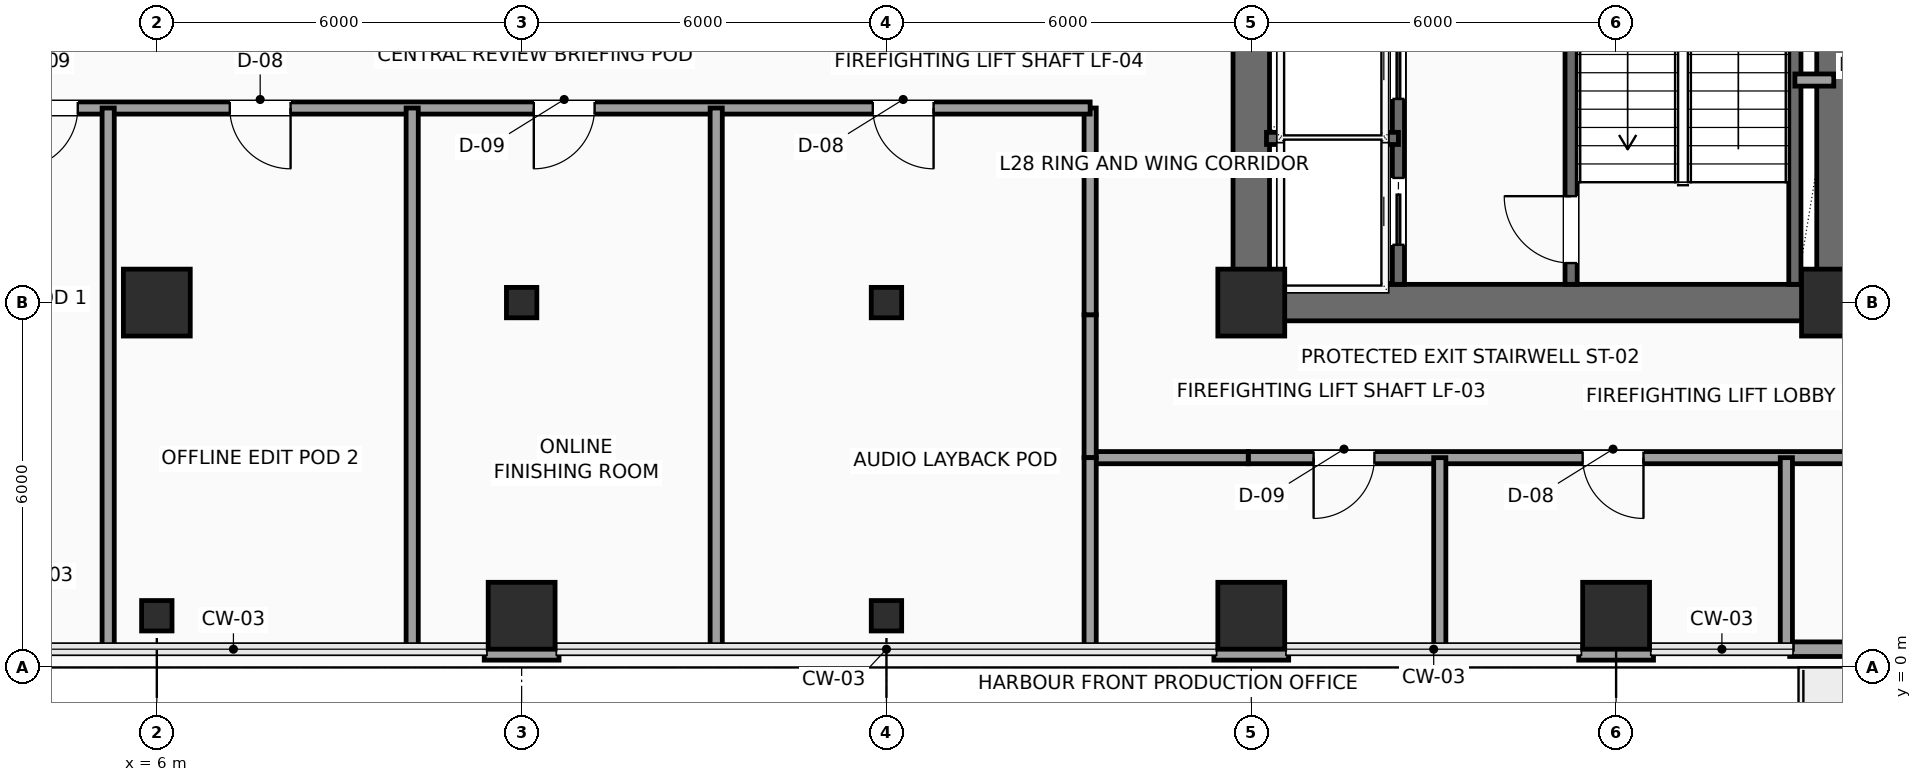
"""IFC4 building model, lengths in metres.
Left out: names, types, materials, properties, quantities, classifications, styles, units other than length and angle.
Written with IfcOpenShell. Run it as: python <this file> out.ifc"""

import sys

from ifc_helpers import new_model, si_unit, direction, frame, frame_2d, origin, origin_2d, place, context, subcontext, project, spatial, rectangle, hollow_rectangle, extrude, element, fill, save


model = new_model("IFC4")
c1 = context("Model", 3, precision=1e-05, world=origin(), true_north=direction((0.0, 1.0)))
c2 = subcontext(c1, "Body", "Model", "MODEL_VIEW")
j1 = project(units=[si_unit("LENGTHUNIT", "METRE"), si_unit("PLANEANGLEUNIT", "RADIAN")], contexts=[c1])
p1 = place(None, origin())
s1 = spatial("IfcSite", under=j1, at=p1, CompositionType="ELEMENT")
p2 = place(p1, origin())
s2 = spatial("IfcBuilding", under=s1, at=p2, CompositionType="ELEMENT")
p3 = place(p2, frame((0.0, 0.0, 119.4)))
s3 = spatial("IfcBuildingStorey", under=s2, at=p3, CompositionType="ELEMENT", Elevation=119.4)
for number, where, z_axis, x_axis in (
    (1, (24.0, 6.0, 0.0), (0.0, 0.0, 1.0), (1.0, 0.0, 0.0)),
    (2, (33.6, 6.0, 0.0), (0.0, 0.0, 1.0), (1.0, 0.0, 0.0)),
):
    element("IfcColumn", number, at=place(p3, frame(where, z_axis=z_axis, x_axis=x_axis)), inside=s3, PredefinedType="COLUMN", context=c2, shape_type="SweptSolid", body=[
        extrude(rectangle(XDim=1.1, YDim=1.1, at=origin_2d()), origin(), (0.0, 0.0, 1.0), 3.75),
    ])
p4 = place(p3, frame((6.0, 0.85, 0.0), z_axis=(0.0, 0.0, 1.0), x_axis=(1.0, 0.0, 0.0)))
e3 = element("IfcColumn", 3, at=p4, inside=s3, PredefinedType="COLUMN", context=c2, shape_type="SweptSolid", body=[
    extrude(hollow_rectangle(XDim=0.5, YDim=0.5, WallThickness=0.025, InnerFilletRadius=0.025, OuterFilletRadius=0.04, at=origin_2d()), origin(), (0.0, 0.0, 1.0), 3.75),
])
for number, where, z_axis, x_axis in (
    (4, (6.0, 6.0, 0.0), (0.0, 0.0, 1.0), (1.0, 0.0, 0.0)),
    (5, (12.0, 0.85, 0.0), (0.0, 0.0, 1.0), (1.0, 0.0, 0.0)),
):
    element("IfcColumn", number, at=place(p3, frame(where, z_axis=z_axis, x_axis=x_axis)), inside=s3, PredefinedType="COLUMN", context=c2, shape_type="SweptSolid", body=[
        extrude(rectangle(XDim=1.1, YDim=1.1, at=origin_2d()), origin(), (0.0, 0.0, 1.0), 3.75),
    ])
for number, where, z_axis, x_axis in (
    (6, (12.0, 6.0, 0.0), (0.0, 0.0, 1.0), (1.0, 0.0, 0.0)),
    (7, (18.0, 0.85, 0.0), (0.0, 0.0, 1.0), (1.0, 0.0, 0.0)),
    (8, (18.0, 6.0, 0.0), (0.0, 0.0, 1.0), (1.0, 0.0, 0.0)),
):
    element("IfcColumn", number, at=place(p3, frame(where, z_axis=z_axis, x_axis=x_axis)), inside=s3, PredefinedType="COLUMN", context=c2, shape_type="SweptSolid", body=[
        extrude(hollow_rectangle(XDim=0.5, YDim=0.5, WallThickness=0.025, InnerFilletRadius=0.025, OuterFilletRadius=0.04, at=origin_2d()), origin(), (0.0, 0.0, 1.0), 3.75),
    ])
for number, where, z_axis, x_axis in (
    (9, (24.0, 0.85, 0.0), (0.0, 0.0, 1.0), (1.0, 0.0, 0.0)),
    (10, (30.0, 0.85, 0.0), (0.0, 0.0, 1.0), (1.0, 0.0, 0.0)),
):
    element("IfcColumn", number, at=place(p3, frame(where, z_axis=z_axis, x_axis=x_axis)), inside=s3, PredefinedType="COLUMN", context=c2, shape_type="SweptSolid", body=[
        extrude(rectangle(XDim=1.1, YDim=1.1, at=origin_2d()), origin(), (0.0, 0.0, 1.0), 3.75),
    ])
p5 = place(p3, frame((42.145, 0.3, 0.0), z_axis=(0.0, 0.0, 1.0), x_axis=(-1.0, 0.0, 0.0)))
e11 = element("IfcWall", 11, at=p5, inside=s3, PredefinedType="SOLIDWALL", context=c2, shape_type="SweptSolid", body=[
    extrude(rectangle(XDim=9.29, YDim=0.24, at=frame_2d((4.645, 0.0))), origin(), (0.0, 0.0, 1.0), 3.525),
])
p6 = place(p5, frame((4.2, 0.0, 0.0)))
e12 = element("IfcOpeningElement", 12, at=p6, cuts=e11, PredefinedType="OPENING", context=c2, shape_type="SweptSolid", body=[
    extrude(rectangle(XDim=1.05, YDim=2.2, at=frame_2d((0.525, 1.1))), frame((0.0, 0.13, 0.0), z_axis=(0.0, -1.0, 0.0), x_axis=(1.0, 0.0, 0.0)), (0.0, 0.0, 1.0), 0.26),
])
for number, where, z_axis, x_axis in (
    (13, (30.615, 0.24, 0.0), (0.0, 0.0, 1.0), (-1.0, 0.0, 0.0)),
    (14, (24.615, 0.24, 0.0), (0.0, 0.0, 1.0), (-1.0, 0.0, 0.0)),
    (15, (12.615, 0.24, 0.0), (0.0, 0.0, 1.0), (-1.0, 0.0, 0.0)),
):
    element("IfcWall", number, at=place(p3, frame(where, z_axis=z_axis, x_axis=x_axis)), inside=s3, PredefinedType="SOLIDWALL", context=c2, shape_type="SweptSolid", body=[
        extrude(rectangle(XDim=1.23, YDim=0.24, at=frame_2d((0.615, 0.0))), origin(), (0.0, 0.0, 1.0), 3.525),
    ])
p7 = place(p3, frame((24.0, 6.0, 0.0), z_axis=(0.0, 0.0, 1.0), x_axis=(1.0, 0.0, 0.0)))
e16 = element("IfcWall", 16, at=p7, inside=s3, PredefinedType="SHEAR", context=c2, shape_type="SweptSolid", body=[
    extrude(rectangle(XDim=9.6, YDim=0.6, at=frame_2d((4.8, 0.0))), origin(), (0.0, 0.0, 1.0), 3.525),
])
p8 = place(p3, frame((24.0, 6.0, 0.0), z_axis=(0.0, 0.0, 1.0), x_axis=(0.0, 1.0, 0.0)))
e17 = element("IfcWall", 17, at=p8, inside=s3, PredefinedType="SHEAR", context=c2, shape_type="SweptSolid", body=[
    extrude(rectangle(XDim=12.0, YDim=0.6, at=frame_2d((6.0, 0.0))), origin(), (0.0, 0.0, 1.0), 3.525),
])
p9 = place(p8, frame((7.15, 0.0, 0.0)))
e18 = element("IfcOpeningElement", 18, at=p9, cuts=e17, PredefinedType="OPENING", context=c2, shape_type="SweptSolid", body=[
    extrude(rectangle(XDim=1.6, YDim=2.3, at=frame_2d((0.8, 1.15))), frame((0.0, 0.31, 0.0), z_axis=(0.0, -1.0, 0.0), x_axis=(1.0, 0.0, 0.0)), (0.0, 0.0, 1.0), 0.62),
])
p10 = place(p3, frame((33.6, 6.0, 0.0), z_axis=(0.0, 0.0, 1.0), x_axis=(0.0, 1.0, 0.0)))
e19 = element("IfcWall", 19, at=p10, inside=s3, PredefinedType="SHEAR", context=c2, shape_type="SweptSolid", body=[
    extrude(rectangle(XDim=12.0, YDim=0.6, at=frame_2d((6.0, 0.0))), origin(), (0.0, 0.0, 1.0), 3.525),
])
p11 = place(p10, frame((10.15, 0.0, 0.0)))
e20 = element("IfcOpeningElement", 20, at=p11, cuts=e19, PredefinedType="OPENING", context=c2, shape_type="SweptSolid", body=[
    extrude(rectangle(XDim=0.9, YDim=2.15, at=frame_2d((0.45, 1.075))), frame((0.0, 0.31, 0.0), z_axis=(0.0, -1.0, 0.0), x_axis=(1.0, 0.0, 0.0)), (0.0, 0.0, 1.0), 0.62),
])
p12 = place(p3, frame((29.26, 6.3, 0.0), z_axis=(0.0, 0.0, 1.0), x_axis=(0.0, 1.0, 0.0)))
e21 = element("IfcWall", 21, at=p12, inside=s3, PredefinedType="SHEAR", context=c2, shape_type="SweptSolid", body=[
    extrude(rectangle(XDim=8.88, YDim=0.2, at=frame_2d((4.44, 0.0))), origin(), (0.0, 0.0, 1.0), 3.525),
])
p13 = place(p12, frame((0.35, 0.0, 0.0)))
e22 = element("IfcOpeningElement", 22, at=p13, cuts=e21, PredefinedType="OPENING", context=c2, shape_type="SweptSolid", body=[
    extrude(rectangle(XDim=1.1, YDim=2.2, at=frame_2d((0.55, 1.1))), frame((0.0, 0.11, 0.0), z_axis=(0.0, -1.0, 0.0), x_axis=(1.0, 0.0, 0.0)), (0.0, 0.0, 1.0), 0.22),
])
p14 = place(p3, frame((32.94, 6.3, 0.0), z_axis=(0.0, 0.0, 1.0), x_axis=(0.0, 1.0, 0.0)))
e23 = element("IfcWall", 23, at=p14, inside=s3, PredefinedType="SHEAR", context=c2, shape_type="SweptSolid", body=[
    extrude(rectangle(XDim=8.88, YDim=0.2, at=frame_2d((4.44, 0.0))), origin(), (0.0, 0.0, 1.0), 3.525),
])
p15 = place(p3, frame((26.42, 6.3, 0.0), z_axis=(0.0, 0.0, 1.0), x_axis=(0.0, 1.0, 0.0)))
e24 = element("IfcWall", 24, at=p15, inside=s3, PredefinedType="SHEAR", context=c2, shape_type="SweptSolid", body=[
    extrude(rectangle(XDim=4.95, YDim=0.2, at=frame_2d((2.475, 0.0))), origin(), (0.0, 0.0, 1.0), 3.525),
])
p16 = place(p15, frame((0.65, 0.0, 0.0)))
e25 = element("IfcOpeningElement", 25, at=p16, cuts=e24, PredefinedType="OPENING", context=c2, shape_type="SweptSolid", body=[
    extrude(rectangle(XDim=1.1, YDim=2.2, at=frame_2d((0.55, 1.1))), frame((0.0, 0.11, 0.0), z_axis=(0.0, -1.0, 0.0), x_axis=(1.0, 0.0, 0.0)), (0.0, 0.0, 1.0), 0.22),
])
p17 = place(p15, frame((3.05, 0.0, 0.0)))
e26 = element("IfcOpeningElement", 26, at=p17, cuts=e24, PredefinedType="OPENING", context=c2, shape_type="SweptSolid", body=[
    extrude(rectangle(XDim=1.1, YDim=2.2, at=frame_2d((0.55, 1.1))), frame((0.0, 0.11, 0.0), z_axis=(0.0, -1.0, 0.0), x_axis=(1.0, 0.0, 0.0)), (0.0, 0.0, 1.0), 0.22),
])
p18 = place(p3, frame((24.25, 8.7, 0.0), z_axis=(0.0, 0.0, 1.0), x_axis=(1.0, 0.0, 0.0)))
e27 = element("IfcWall", 27, at=p18, inside=s3, PredefinedType="SHEAR", context=c2, shape_type="SweptSolid", body=[
    extrude(rectangle(XDim=2.17, YDim=0.2, at=frame_2d((1.085, 0.0))), origin(), (0.0, 0.0, 1.0), 3.525),
])
p19 = place(p3, frame((32.94, 9.66, 0.0), z_axis=(0.0, 0.0, 1.0), x_axis=(1.0, 0.0, 0.0)))
e28 = element("IfcWall", 28, at=p19, inside=s3, PredefinedType="SOLIDWALL", context=c2, shape_type="SweptSolid", body=[
    extrude(rectangle(XDim=0.64, YDim=0.2, at=frame_2d((0.32, 0.0))), origin(), (0.0, 0.0, 1.0), 3.525),
])
p20 = place(p3, frame((36.15, 3.45, 0.0), z_axis=(0.0, 0.0, 1.0), x_axis=(-1.0, 0.0, 0.0)))
e29 = element("IfcWall", 29, at=p20, inside=s3, PredefinedType="SOLIDWALL", context=c2, shape_type="SweptSolid", body=[
    extrude(rectangle(XDim=12.2, YDim=0.2, at=frame_2d((6.1, 0.0))), origin(), (0.0, 0.0, 1.0), 3.067),
])
p21 = place(p20, frame((10.125, 0.0, 0.0)))
e30 = element("IfcOpeningElement", 30, at=p21, cuts=e29, PredefinedType="OPENING", context=c2, shape_type="SweptSolid", body=[
    extrude(rectangle(XDim=1.0, YDim=2.2, at=frame_2d((0.5, 1.1))), frame((0.0, 0.11, 0.0), z_axis=(0.0, -1.0, 0.0), x_axis=(1.0, 0.0, 0.0)), (0.0, 0.0, 1.0), 0.22),
])
p22 = place(p20, frame((5.7, 0.0, 0.0)))
e31 = element("IfcOpeningElement", 31, at=p22, cuts=e29, PredefinedType="OPENING", context=c2, shape_type="SweptSolid", body=[
    extrude(rectangle(XDim=1.0, YDim=2.2, at=frame_2d((0.5, 1.1))), frame((0.0, 0.11, 0.0), z_axis=(0.0, -1.0, 0.0), x_axis=(1.0, 0.0, 0.0)), (0.0, 0.0, 1.0), 0.22),
])
p23 = place(p3, frame((23.95, 3.45, 0.0), z_axis=(0.0, 0.0, 1.0), x_axis=(-1.0, 0.0, 0.0)))
e32 = element("IfcWall", 32, at=p23, inside=s3, PredefinedType="SOLIDWALL", context=c2, shape_type="SweptSolid", body=[
    extrude(rectangle(XDim=2.6, YDim=0.2, at=frame_2d((1.3, 0.0))), origin(), (0.0, 0.0, 1.0), 3.067),
])
p24 = place(p3, frame((21.35, 3.45, 0.0), z_axis=(0.0, 0.0, 1.0), x_axis=(0.0, 1.0, 0.0)))
e33 = element("IfcWall", 33, at=p24, inside=s3, PredefinedType="SOLIDWALL", context=c2, shape_type="SweptSolid", body=[
    extrude(rectangle(XDim=2.35, YDim=0.2, at=frame_2d((1.175, 0.0))), origin(), (0.0, 0.0, 1.0), 3.525),
])
p25 = place(p3, frame((21.35, 5.8, 0.0), z_axis=(0.0, 0.0, 1.0), x_axis=(0.0, 1.0, 0.0)))
e34 = element("IfcWall", 34, at=p25, inside=s3, PredefinedType="SOLIDWALL", context=c2, shape_type="SweptSolid", body=[
    extrude(rectangle(XDim=3.4, YDim=0.2, at=frame_2d((1.7, 0.0))), origin(), (0.0, 0.0, 1.0), 3.525),
])
p26 = place(p3, frame((21.35, 9.2, 0.0), z_axis=(0.0, 0.0, 1.0), x_axis=(-1.0, 0.0, 0.0)))
e35 = element("IfcWall", 35, at=p26, inside=s3, PredefinedType="SOLIDWALL", context=c2, shape_type="SweptSolid", body=[
    extrude(rectangle(XDim=18.15, YDim=0.2, at=frame_2d((9.075, 0.0))), origin(), (0.0, 0.0, 1.0), 3.067),
])
p27 = place(p26, frame((16.65, 0.0, 0.0)))
e36 = element("IfcOpeningElement", 36, at=p27, cuts=e35, PredefinedType="OPENING", context=c2, shape_type="SweptSolid", body=[
    extrude(rectangle(XDim=1.0, YDim=2.2, at=frame_2d((0.5, 1.1))), frame((0.0, 0.11, 0.0), z_axis=(0.0, -1.0, 0.0), x_axis=(1.0, 0.0, 0.0)), (0.0, 0.0, 1.0), 0.22),
])
p28 = place(p26, frame((13.15, 0.0, 0.0)))
e37 = element("IfcOpeningElement", 37, at=p28, cuts=e35, PredefinedType="OPENING", context=c2, shape_type="SweptSolid", body=[
    extrude(rectangle(XDim=1.0, YDim=2.2, at=frame_2d((0.5, 1.1))), frame((0.0, 0.11, 0.0), z_axis=(0.0, -1.0, 0.0), x_axis=(1.0, 0.0, 0.0)), (0.0, 0.0, 1.0), 0.22),
])
p29 = place(p26, frame((8.15, 0.0, 0.0)))
e38 = element("IfcOpeningElement", 38, at=p29, cuts=e35, PredefinedType="OPENING", context=c2, shape_type="SweptSolid", body=[
    extrude(rectangle(XDim=1.0, YDim=2.2, at=frame_2d((0.5, 1.1))), frame((0.0, 0.11, 0.0), z_axis=(0.0, -1.0, 0.0), x_axis=(1.0, 0.0, 0.0)), (0.0, 0.0, 1.0), 0.22),
])
p30 = place(p26, frame((2.575, 0.0, 0.0)))
e39 = element("IfcOpeningElement", 39, at=p30, cuts=e35, PredefinedType="OPENING", context=c2, shape_type="SweptSolid", body=[
    extrude(rectangle(XDim=1.0, YDim=2.2, at=frame_2d((0.5, 1.1))), frame((0.0, 0.11, 0.0), z_axis=(0.0, -1.0, 0.0), x_axis=(1.0, 0.0, 0.0)), (0.0, 0.0, 1.0), 0.22),
])
for number, where, z_axis, x_axis in (
    (40, (21.35, 0.3, 0.0), (0.0, 0.0, 1.0), (0.0, 1.0, 0.0)),
    (41, (27.1, 0.3, 0.0), (0.0, 0.0, 1.0), (0.0, 1.0, 0.0)),
    (42, (32.8, 0.3, 0.0), (0.0, 0.0, 1.0), (0.0, 1.0, 0.0)),
):
    element("IfcWall", number, at=place(p3, frame(where, z_axis=z_axis, x_axis=x_axis)), inside=s3, PredefinedType="PARTITIONING", context=c2, shape_type="SweptSolid", body=[
        extrude(rectangle(XDim=3.15, YDim=0.2, at=frame_2d((1.575, 0.0))), origin(), (0.0, 0.0, 1.0), 3.525),
    ])
p31 = place(p3, frame((33.65, 5.8, 0.0), z_axis=(0.0, 0.0, 1.0), x_axis=(1.0, 0.0, 0.0)))
e43 = element("IfcWall", 43, at=p31, inside=s3, PredefinedType="PARTITIONING", context=c2, shape_type="SweptSolid", body=[
    extrude(rectangle(XDim=2.5, YDim=0.2, at=frame_2d((1.25, 0.0))), origin(), (0.0, 0.0, 1.0), 3.017),
])
for number, where, z_axis, x_axis in (
    (44, (5.2, 0.3, 0.0), (0.0, 0.0, 1.0), (0.0, 1.0, 0.0)),
    (45, (10.2, 0.3, 0.0), (0.0, 0.0, 1.0), (0.0, 1.0, 0.0)),
    (46, (15.2, 0.3, 0.0), (0.0, 0.0, 1.0), (0.0, 1.0, 0.0)),
):
    element("IfcWall", number, at=place(p3, frame(where, z_axis=z_axis, x_axis=x_axis)), inside=s3, PredefinedType="PARTITIONING", context=c2, shape_type="SweptSolid", body=[
        extrude(rectangle(XDim=8.9, YDim=0.2, at=frame_2d((4.45, 0.0))), origin(), (0.0, 0.0, 1.0), 3.525),
    ])
p32 = place(p13, origin())
e47 = element("IfcDoor", 47, at=p32, inside=s3, OperationType="SINGLE_SWING_RIGHT", PredefinedType="DOOR", context=c2, shape_type="SweptSolid", body=[
    extrude(rectangle(XDim=1.1, YDim=2.2, at=frame_2d((0.55, 1.1))), frame((0.0, 0.025, 0.0), z_axis=(0.0, -1.0, 0.0), x_axis=(1.0, 0.0, 0.0)), (0.0, 0.0, 1.0), 0.05),
])
fill(e22, e47)
p33 = place(p16, origin())
e48 = element("IfcDoor", 48, at=p33, inside=s3, OperationType="SLIDING_TO_LEFT", PredefinedType="DOOR", context=c2, shape_type="SweptSolid", body=[
    extrude(rectangle(XDim=1.1, YDim=2.2, at=frame_2d((0.55, 1.1))), frame((0.0, 0.025, 0.0), z_axis=(0.0, -1.0, 0.0), x_axis=(1.0, 0.0, 0.0)), (0.0, 0.0, 1.0), 0.05),
])
fill(e25, e48)
p34 = place(p17, origin())
e49 = element("IfcDoor", 49, at=p34, inside=s3, OperationType="SLIDING_TO_LEFT", PredefinedType="DOOR", context=c2, shape_type="SweptSolid", body=[
    extrude(rectangle(XDim=1.1, YDim=2.2, at=frame_2d((0.55, 1.1))), frame((0.0, 0.025, 0.0), z_axis=(0.0, -1.0, 0.0), x_axis=(1.0, 0.0, 0.0)), (0.0, 0.0, 1.0), 0.05),
])
fill(e26, e49)
p35 = place(p21, origin())
e50 = element("IfcDoor", 50, at=p35, inside=s3, OperationType="SINGLE_SWING_RIGHT", PredefinedType="DOOR", context=c2, shape_type="SweptSolid", body=[
    extrude(rectangle(XDim=1.0, YDim=2.2, at=frame_2d((0.5, 1.1))), frame((0.0, 0.025, 0.0), z_axis=(0.0, -1.0, 0.0), x_axis=(1.0, 0.0, 0.0)), (0.0, 0.0, 1.0), 0.05),
])
fill(e30, e50)
p36 = place(p22, origin())
e51 = element("IfcDoor", 51, at=p36, inside=s3, OperationType="SINGLE_SWING_LEFT", PredefinedType="DOOR", context=c2, shape_type="SweptSolid", body=[
    extrude(rectangle(XDim=1.0, YDim=2.2, at=frame_2d((0.5, 1.1))), frame((0.0, 0.025, 0.0), z_axis=(0.0, -1.0, 0.0), x_axis=(1.0, 0.0, 0.0)), (0.0, 0.0, 1.0), 0.05),
])
fill(e31, e51)
p37 = place(p27, origin())
e52 = element("IfcDoor", 52, at=p37, inside=s3, OperationType="SINGLE_SWING_RIGHT", PredefinedType="DOOR", context=c2, shape_type="SweptSolid", body=[
    extrude(rectangle(XDim=1.0, YDim=2.2, at=frame_2d((0.5, 1.1))), frame((0.0, 0.025, 0.0), z_axis=(0.0, -1.0, 0.0), x_axis=(1.0, 0.0, 0.0)), (0.0, 0.0, 1.0), 0.05),
])
fill(e36, e52)
p38 = place(p28, origin())
e53 = element("IfcDoor", 53, at=p38, inside=s3, OperationType="SINGLE_SWING_LEFT", PredefinedType="DOOR", context=c2, shape_type="SweptSolid", body=[
    extrude(rectangle(XDim=1.0, YDim=2.2, at=frame_2d((0.5, 1.1))), frame((0.0, 0.025, 0.0), z_axis=(0.0, -1.0, 0.0), x_axis=(1.0, 0.0, 0.0)), (0.0, 0.0, 1.0), 0.05),
])
fill(e37, e53)
p39 = place(p29, origin())
e54 = element("IfcDoor", 54, at=p39, inside=s3, OperationType="SINGLE_SWING_RIGHT", PredefinedType="DOOR", context=c2, shape_type="SweptSolid", body=[
    extrude(rectangle(XDim=1.0, YDim=2.2, at=frame_2d((0.5, 1.1))), frame((0.0, 0.025, 0.0), z_axis=(0.0, -1.0, 0.0), x_axis=(1.0, 0.0, 0.0)), (0.0, 0.0, 1.0), 0.05),
])
fill(e38, e54)
p40 = place(p30, origin())
e55 = element("IfcDoor", 55, at=p40, inside=s3, OperationType="SINGLE_SWING_LEFT", PredefinedType="DOOR", context=c2, shape_type="SweptSolid", body=[
    extrude(rectangle(XDim=1.0, YDim=2.2, at=frame_2d((0.5, 1.1))), frame((0.0, 0.025, 0.0), z_axis=(0.0, -1.0, 0.0), x_axis=(1.0, 0.0, 0.0)), (0.0, 0.0, 1.0), 0.05),
])
fill(e39, e55)
save(model, sys.argv[1])
